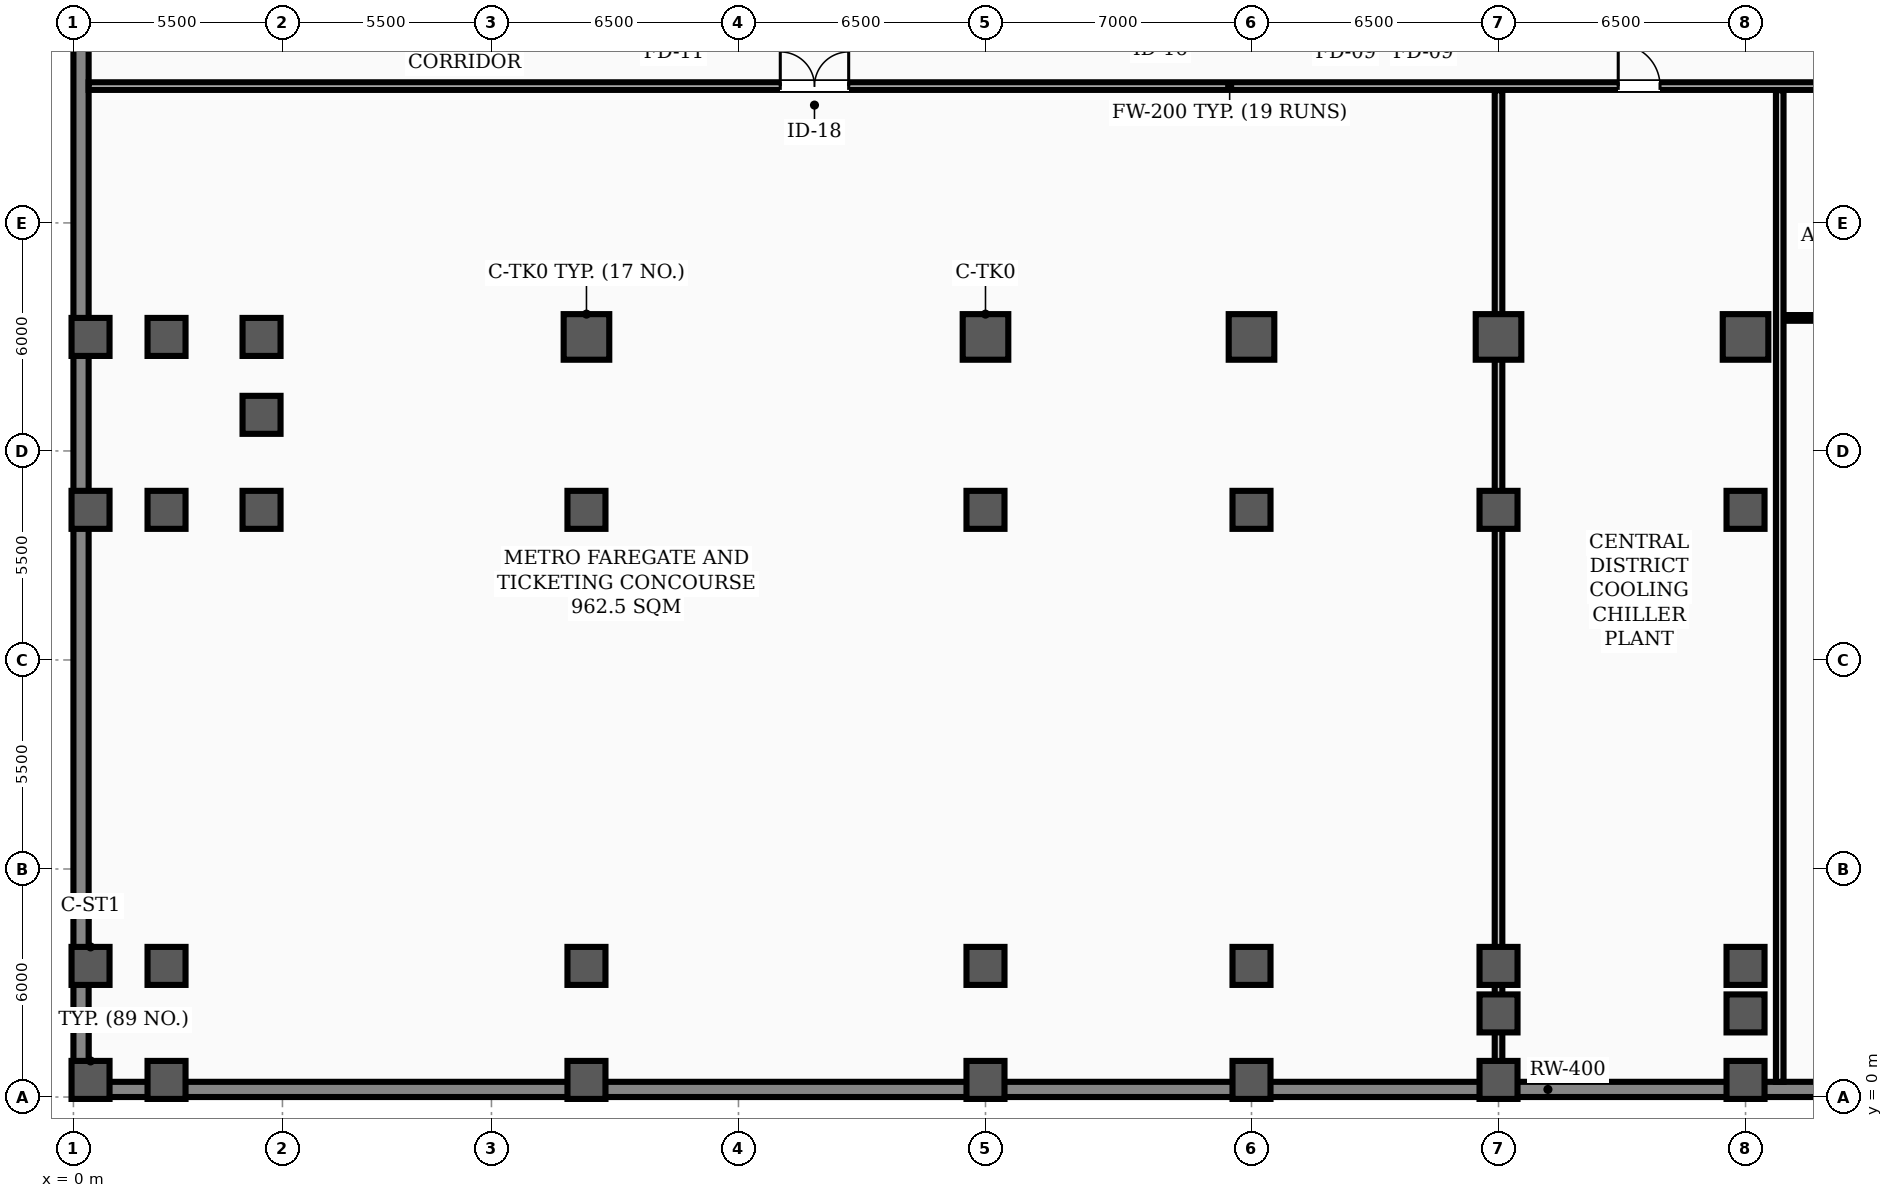
"""IFC4 building model, lengths in metres.
Left out: names, types, materials, properties, quantities, classifications, styles, units other than length and angle.
Written with IfcOpenShell. Run it as: python <this file> out.ifc"""

import sys

from ifc_helpers import new_model, si_unit, direction, frame, frame_2d, origin, origin_2d, place, context, subcontext, project, spatial, rectangle, hollow_rectangle, extrude, element, fill, save


model = new_model("IFC4")
c1 = context("Model", 3, precision=1e-05, world=origin(), true_north=direction((0.0, 1.0)))
c2 = subcontext(c1, "Body", "Model", "MODEL_VIEW")
j1 = project(units=[si_unit("LENGTHUNIT", "METRE"), si_unit("PLANEANGLEUNIT", "RADIAN")], contexts=[c1])
p1 = place(None, origin())
s1 = spatial("IfcSite", under=j1, at=p1, CompositionType="ELEMENT")
p2 = place(p1, origin())
s2 = spatial("IfcBuilding", under=s1, at=p2, CompositionType="ELEMENT")
p3 = place(p2, frame((0.0, 0.0, -10.2)))
s3 = spatial("IfcBuildingStorey", under=s2, at=p3, CompositionType="ELEMENT", Elevation=-10.2)
for number, where, z_axis, x_axis in (
    (1, (13.5, 20.0, 0.0), (0.0, 0.0, 1.0), (1.0, 0.0, 0.0)),
    (2, (24.0, 20.0, 0.0), (0.0, 0.0, 1.0), (1.0, 0.0, 0.0)),
    (3, (31.0, 20.0, 0.0), (0.0, 0.0, 1.0), (1.0, 0.0, 0.0)),
    (4, (37.5, 20.0, 0.0), (0.0, 0.0, 1.0), (1.0, 0.0, 0.0)),
    (5, (44.0, 20.0, 0.0), (0.0, 0.0, 1.0), (1.0, 0.0, 0.0)),
):
    element("IfcColumn", number, at=place(p3, frame(where, z_axis=z_axis, x_axis=x_axis)), inside=s3, PredefinedType="COLUMN", context=c2, shape_type="SweptSolid", body=[
        extrude(hollow_rectangle(XDim=1.2, YDim=1.2, WallThickness=0.04, InnerFilletRadius=0.02, OuterFilletRadius=0.06, at=origin_2d()), origin(), (0.0, 0.0, 1.0), 5.2),
    ])
for number, where, z_axis, x_axis in (
    (6, (0.45, 0.45, 0.0), (0.0, 0.0, 1.0), (1.0, 0.0, 0.0)),
    (7, (0.45, 3.45, 0.0), (0.0, 0.0, 1.0), (1.0, 0.0, 0.0)),
    (8, (0.45, 15.45, 0.0), (0.0, 0.0, 1.0), (1.0, 0.0, 0.0)),
    (9, (0.45, 20.0, 0.0), (0.0, 0.0, 1.0), (1.0, 0.0, 0.0)),
    (10, (2.45, 0.45, 0.0), (0.0, 0.0, 1.0), (1.0, 0.0, 0.0)),
    (11, (2.45, 3.45, 0.0), (0.0, 0.0, 1.0), (1.0, 0.0, 0.0)),
    (12, (2.45, 15.45, 0.0), (0.0, 0.0, 1.0), (1.0, 0.0, 0.0)),
    (13, (2.45, 20.0, 0.0), (0.0, 0.0, 1.0), (1.0, 0.0, 0.0)),
    (14, (4.95, 15.45, 0.0), (0.0, 0.0, 1.0), (1.0, 0.0, 0.0)),
    (15, (4.95, 17.95, 0.0), (0.0, 0.0, 1.0), (1.0, 0.0, 0.0)),
    (16, (4.95, 20.0, 0.0), (0.0, 0.0, 1.0), (1.0, 0.0, 0.0)),
    (17, (13.5, 0.45, 0.0), (0.0, 0.0, 1.0), (1.0, 0.0, 0.0)),
    (18, (13.5, 3.45, 0.0), (0.0, 0.0, 1.0), (1.0, 0.0, 0.0)),
    (19, (13.5, 15.45, 0.0), (0.0, 0.0, 1.0), (1.0, 0.0, 0.0)),
    (20, (24.0, 0.45, 0.0), (0.0, 0.0, 1.0), (1.0, 0.0, 0.0)),
    (21, (24.0, 3.45, 0.0), (0.0, 0.0, 1.0), (1.0, 0.0, 0.0)),
    (22, (24.0, 15.45, 0.0), (0.0, 0.0, 1.0), (1.0, 0.0, 0.0)),
    (23, (31.0, 0.45, 0.0), (0.0, 0.0, 1.0), (1.0, 0.0, 0.0)),
    (24, (31.0, 3.45, 0.0), (0.0, 0.0, 1.0), (1.0, 0.0, 0.0)),
    (25, (31.0, 15.45, 0.0), (0.0, 0.0, 1.0), (1.0, 0.0, 0.0)),
    (26, (37.5, 0.45, 0.0), (0.0, 0.0, 1.0), (1.0, 0.0, 0.0)),
    (27, (37.5, 2.2, 0.0), (0.0, 0.0, 1.0), (1.0, 0.0, 0.0)),
    (28, (37.5, 3.45, 0.0), (0.0, 0.0, 1.0), (1.0, 0.0, 0.0)),
    (29, (37.5, 15.45, 0.0), (0.0, 0.0, 1.0), (1.0, 0.0, 0.0)),
    (30, (44.0, 0.45, 0.0), (0.0, 0.0, 1.0), (1.0, 0.0, 0.0)),
    (31, (44.0, 2.2, 0.0), (0.0, 0.0, 1.0), (1.0, 0.0, 0.0)),
    (32, (44.0, 3.45, 0.0), (0.0, 0.0, 1.0), (1.0, 0.0, 0.0)),
    (33, (44.0, 15.45, 0.0), (0.0, 0.0, 1.0), (1.0, 0.0, 0.0)),
):
    element("IfcColumn", number, at=place(p3, frame(where, z_axis=z_axis, x_axis=x_axis)), inside=s3, PredefinedType="COLUMN", context=c2, shape_type="SweptSolid", body=[
        extrude(rectangle(XDim=1.0, YDim=1.0, at=origin_2d()), origin(), (0.0, 0.0, 1.0), 5.2),
    ])
p4 = place(p3, frame((0.2, 0.2, 0.0), z_axis=(0.0, 0.0, 1.0), x_axis=(1.0, 0.0, 0.0)))
e34 = element("IfcWall", 34, at=p4, inside=s3, PredefinedType="SOLIDWALL", context=c2, shape_type="SweptSolid", body=[
    extrude(rectangle(XDim=77.2, YDim=0.4, at=frame_2d((38.6, 0.0))), origin(), (0.0, 0.0, 1.0), 4.92),
])
p5 = place(p3, frame((0.2, 51.4, 0.0), z_axis=(0.0, 0.0, 1.0), x_axis=(0.0, -1.0, 0.0)))
e35 = element("IfcWall", 35, at=p5, inside=s3, PredefinedType="SOLIDWALL", context=c2, shape_type="SweptSolid", body=[
    extrude(rectangle(XDim=51.2, YDim=0.4, at=frame_2d((25.6, 0.0))), origin(), (0.0, 0.0, 1.0), 4.92),
])
p6 = place(p3, frame((0.4, 26.6, 0.0), z_axis=(0.0, 0.0, 1.0), x_axis=(1.0, 0.0, 0.0)))
e36 = element("IfcWall", 36, at=p6, inside=s3, PredefinedType="STANDARD", context=c2, shape_type="SweptSolid", body=[
    extrude(rectangle(XDim=60.05, YDim=0.2, at=frame_2d((30.025, 0.0))), origin(), (0.0, 0.0, 1.0), 4.2),
])
p7 = place(p6, frame((18.2, 0.0, 0.0)))
e37 = element("IfcOpeningElement", 37, at=p7, cuts=e36, PredefinedType="OPENING", context=c2, shape_type="SweptSolid", body=[
    extrude(rectangle(XDim=1.8, YDim=2.08, at=frame_2d((0.9, 1.04))), frame((0.0, 0.11, 0.0), z_axis=(0.0, -1.0, 0.0), x_axis=(1.0, 0.0, 0.0)), (0.0, 0.0, 1.0), 0.22),
])
p8 = place(p6, frame((40.25, 0.0, 0.0)))
e38 = element("IfcOpeningElement", 38, at=p8, cuts=e36, PredefinedType="OPENING", context=c2, shape_type="SweptSolid", body=[
    extrude(rectangle(XDim=1.1, YDim=2.08, at=frame_2d((0.55, 1.04))), frame((0.0, 0.11, 0.0), z_axis=(0.0, -1.0, 0.0), x_axis=(1.0, 0.0, 0.0)), (0.0, 0.0, 1.0), 0.22),
])
p9 = place(p6, frame((46.325, 0.0, 0.0)))
e39 = element("IfcOpeningElement", 39, at=p9, cuts=e36, PredefinedType="OPENING", context=c2, shape_type="SweptSolid", body=[
    extrude(rectangle(XDim=0.95, YDim=2.08, at=frame_2d((0.475, 1.04))), frame((0.0, 0.11, 0.0), z_axis=(0.0, -1.0, 0.0), x_axis=(1.0, 0.0, 0.0)), (0.0, 0.0, 1.0), 0.22),
])
p10 = place(p6, frame((50.925, 0.0, 0.0)))
e40 = element("IfcOpeningElement", 40, at=p10, cuts=e36, PredefinedType="OPENING", context=c2, shape_type="SweptSolid", body=[
    extrude(rectangle(XDim=0.95, YDim=2.08, at=frame_2d((0.475, 1.04))), frame((0.0, 0.11, 0.0), z_axis=(0.0, -1.0, 0.0), x_axis=(1.0, 0.0, 0.0)), (0.0, 0.0, 1.0), 0.22),
])
p11 = place(p3, frame((44.9, 20.5, 0.0), z_axis=(0.0, 0.0, 1.0), x_axis=(1.0, 0.0, 0.0)))
e41 = element("IfcWall", 41, at=p11, inside=s3, PredefinedType="PARTITIONING", context=c2, shape_type="SweptSolid", body=[
    extrude(rectangle(XDim=9.25, YDim=0.15, at=frame_2d((4.625, 0.0))), origin(), (0.0, 0.0, 1.0), 4.1),
])
for number, where, z_axis, x_axis in (
    (42, (37.5, 0.4, 0.0), (0.0, 0.0, 1.0), (0.0, 1.0, 0.0)),
    (43, (44.9, 0.4, 0.0), (0.0, 0.0, 1.0), (0.0, 1.0, 0.0)),
):
    element("IfcWall", number, at=place(p3, frame(where, z_axis=z_axis, x_axis=x_axis)), inside=s3, PredefinedType="STANDARD", context=c2, shape_type="SweptSolid", body=[
        extrude(rectangle(XDim=26.09, YDim=0.2, at=frame_2d((13.045, 0.0))), origin(), (0.0, 0.0, 1.0), 4.1),
    ])
p12 = place(p7, origin())
e44 = element("IfcDoor", 44, at=p12, inside=s3, OperationType="DOUBLE_DOOR_SINGLE_SWING", PredefinedType="DOOR", context=c2, shape_type="SweptSolid", body=[
    extrude(rectangle(XDim=1.8, YDim=2.08, at=frame_2d((0.9, 1.04))), frame((0.0, 0.025, 0.0), z_axis=(0.0, -1.0, 0.0), x_axis=(1.0, 0.0, 0.0)), (0.0, 0.0, 1.0), 0.05),
])
fill(e37, e44)
p13 = place(p8, origin())
e45 = element("IfcDoor", 45, at=p13, inside=s3, OperationType="SINGLE_SWING_LEFT", PredefinedType="DOOR", context=c2, shape_type="SweptSolid", body=[
    extrude(rectangle(XDim=1.1, YDim=2.08, at=frame_2d((0.55, 1.04))), frame((0.0, 0.025, 0.0), z_axis=(0.0, -1.0, 0.0), x_axis=(1.0, 0.0, 0.0)), (0.0, 0.0, 1.0), 0.05),
])
fill(e38, e45)
save(model, sys.argv[1])
